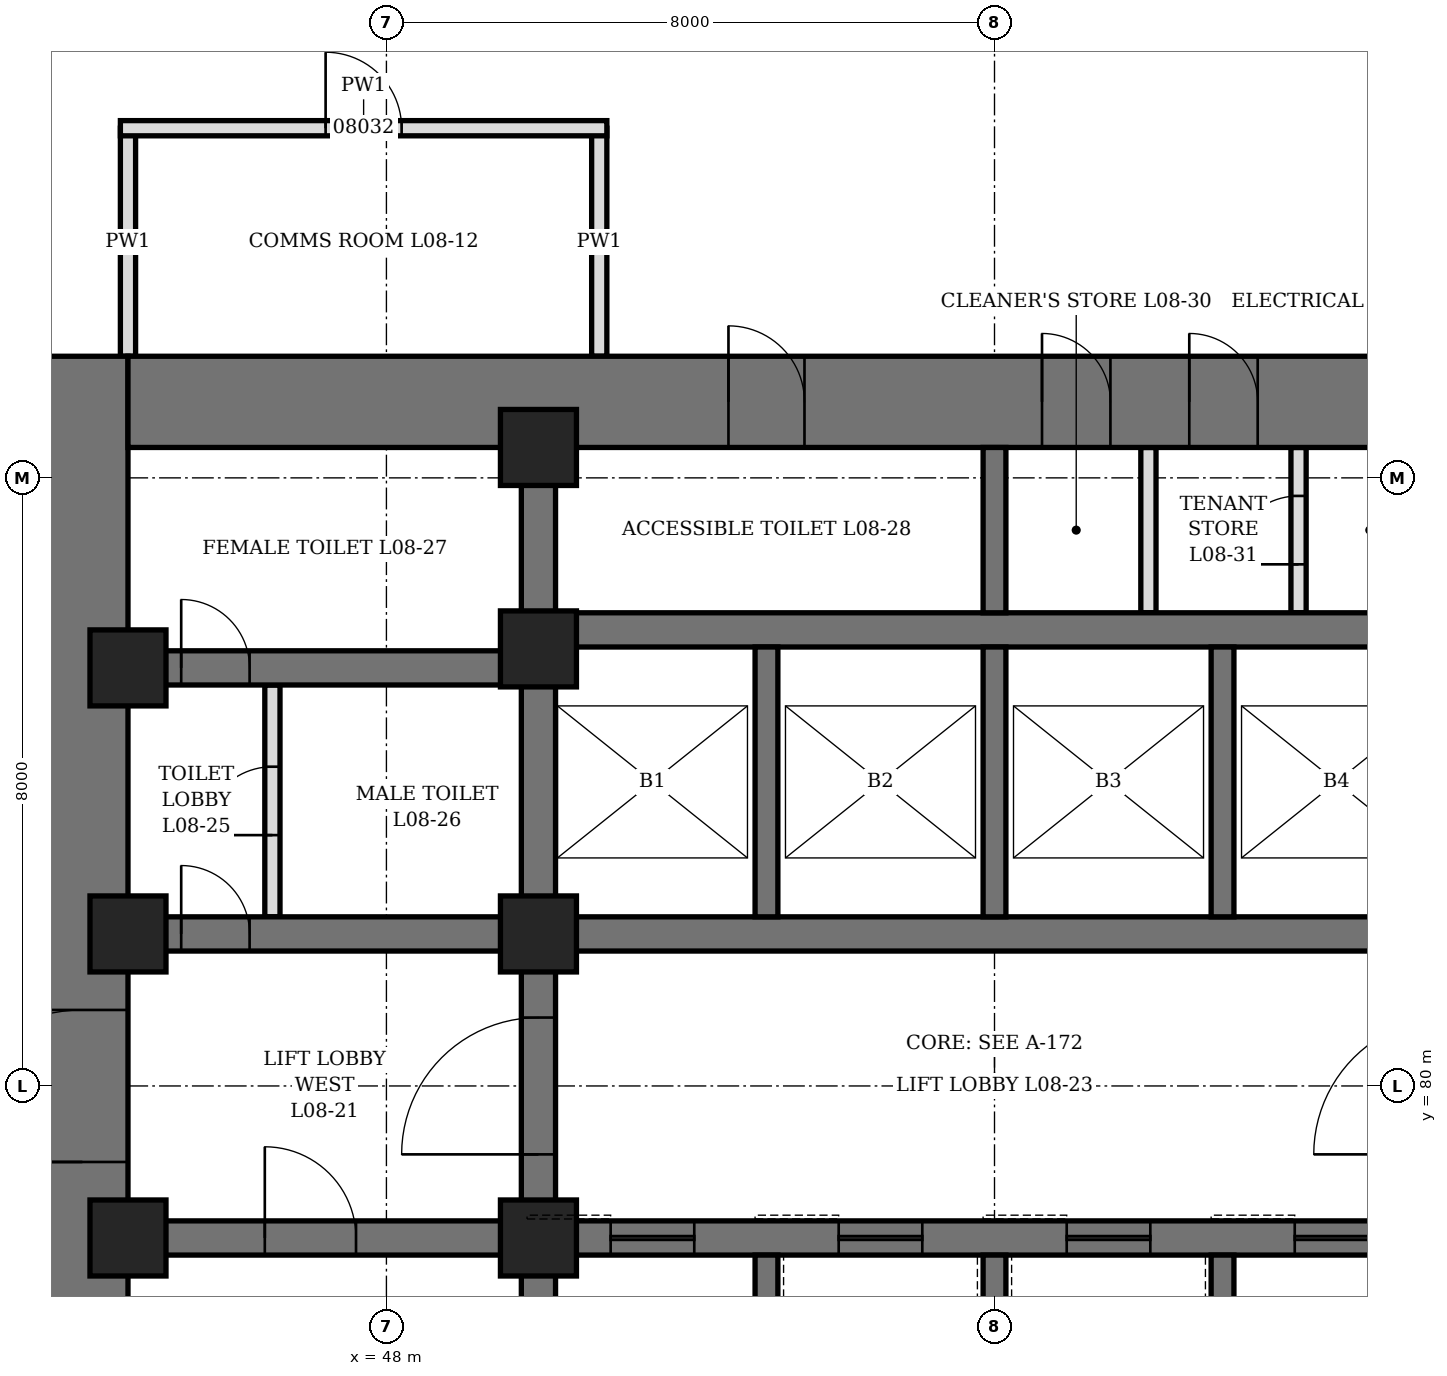
"""IFC4 building model, lengths in metres.
Left out: names, types, materials, properties, quantities, classifications, styles, units other than length and angle.
Written with IfcOpenShell. Run it as: python <this file> out.ifc"""

import sys

from ifc_helpers import new_model, si_unit, direction, frame, frame_2d, origin, origin_2d, place, context, subcontext, project, spatial, rectangle, hollow_rectangle, extrude, element, fill, save


model = new_model("IFC4")
c1 = context("Model", 3, precision=1e-05, world=origin(), true_north=direction((0.0, 1.0)))
c2 = subcontext(c1, "Body", "Model", "MODEL_VIEW")
j1 = project(units=[si_unit("LENGTHUNIT", "METRE"), si_unit("PLANEANGLEUNIT", "RADIAN")], contexts=[c1])
p1 = place(None, origin())
s1 = spatial("IfcSite", under=j1, at=p1, CompositionType="ELEMENT")
p2 = place(p1, origin())
s2 = spatial("IfcBuilding", under=s1, at=p2, CompositionType="ELEMENT")
p3 = place(p2, frame((0.0, 0.0, 43.3)))
s3 = spatial("IfcBuildingStorey", under=s2, at=p3, CompositionType="ELEMENT", Elevation=43.3)
p4 = place(p3, frame((44.0, 70.4, 0.0), z_axis=(0.0, 0.0, 1.0), x_axis=(0.0, 1.0, 0.0)))
e1 = element("IfcWall", 1, at=p4, inside=s3, PredefinedType="SHEAR", context=c2, shape_type="SweptSolid", body=[
    extrude(rectangle(XDim=19.2, YDim=1.2, at=frame_2d((9.6, 0.0))), origin(), (0.0, 0.0, 1.0), 4.2),
])
p5 = place(p4, frame((8.6, 0.0, 0.0)))
e2 = element("IfcOpeningElement", 2, at=p5, cuts=e1, PredefinedType="OPENING", context=c2, shape_type="SweptSolid", body=[
    extrude(rectangle(XDim=2.0, YDim=2.4, at=frame_2d((1.0, 1.2))), frame((0.0, 0.61, 0.0), z_axis=(0.0, -1.0, 0.0), x_axis=(1.0, 0.0, 0.0)), (0.0, 0.0, 1.0), 1.22),
])
p6 = place(p3, frame((44.6, 89.0, 0.0), z_axis=(0.0, 0.0, 1.0), x_axis=(1.0, 0.0, 0.0)))
e3 = element("IfcWall", 3, at=p6, inside=s3, PredefinedType="SHEAR", context=c2, shape_type="SweptSolid", body=[
    extrude(rectangle(XDim=22.8, YDim=1.2, at=frame_2d((11.4, 0.0))), origin(), (0.0, 0.0, 1.0), 4.2),
])
p7 = place(p6, frame((7.9, 0.0, 0.0)))
e4 = element("IfcOpeningElement", 4, at=p7, cuts=e3, PredefinedType="OPENING", context=c2, shape_type="SweptSolid", body=[
    extrude(rectangle(XDim=1.0, YDim=2.1, at=frame_2d((0.5, 1.05))), frame((0.0, 0.61, 0.0), z_axis=(0.0, -1.0, 0.0), x_axis=(1.0, 0.0, 0.0)), (0.0, 0.0, 1.0), 1.22),
])
p8 = place(p6, frame((12.025, 0.0, 0.0)))
e5 = element("IfcOpeningElement", 5, at=p8, cuts=e3, PredefinedType="OPENING", context=c2, shape_type="SweptSolid", body=[
    extrude(rectangle(XDim=0.9, YDim=2.1, at=frame_2d((0.45, 1.05))), frame((0.0, 0.61, 0.0), z_axis=(0.0, -1.0, 0.0), x_axis=(1.0, 0.0, 0.0)), (0.0, 0.0, 1.0), 1.22),
])
p9 = place(p6, frame((13.962, 0.0, 0.0)))
e6 = element("IfcOpeningElement", 6, at=p9, cuts=e3, PredefinedType="OPENING", context=c2, shape_type="SweptSolid", body=[
    extrude(rectangle(XDim=0.9, YDim=2.1, at=frame_2d((0.45, 1.05))), frame((0.0, 0.61, 0.0), z_axis=(0.0, -1.0, 0.0), x_axis=(1.0, 0.0, 0.0)), (0.0, 0.0, 1.0), 1.22),
])
p10 = place(p3, frame((50.0, 71.6, 0.0), z_axis=(0.0, 0.0, 1.0), x_axis=(0.0, 1.0, 0.0)))
e7 = element("IfcWall", 7, at=p10, inside=s3, PredefinedType="SHEAR", context=c2, shape_type="SweptSolid", body=[
    extrude(rectangle(XDim=16.8, YDim=0.45, at=frame_2d((8.4, 0.0))), origin(), (0.0, 0.0, 1.0), 4.2),
])
p11 = place(p10, frame((7.5, 0.0, 0.0)))
e8 = element("IfcOpeningElement", 8, at=p11, cuts=e7, PredefinedType="OPENING", context=c2, shape_type="SweptSolid", body=[
    extrude(rectangle(XDim=1.8, YDim=2.4, at=frame_2d((0.9, 1.2))), frame((0.0, 0.235, 0.0), z_axis=(0.0, -1.0, 0.0), x_axis=(1.0, 0.0, 0.0)), (0.0, 0.0, 1.0), 0.47),
])
p12 = place(p3, frame((44.6, 78.0, 0.0), z_axis=(0.0, 0.0, 1.0), x_axis=(1.0, 0.0, 0.0)))
e9 = element("IfcWall", 9, at=p12, inside=s3, PredefinedType="SHEAR", context=c2, shape_type="SweptSolid", body=[
    extrude(rectangle(XDim=5.175, YDim=0.45, at=frame_2d((2.587, 0.0))), origin(), (0.0, 0.0, 1.0), 4.2),
])
p13 = place(p12, frame((1.8, 0.0, 0.0)))
e10 = element("IfcOpeningElement", 10, at=p13, cuts=e9, PredefinedType="OPENING", context=c2, shape_type="SweptSolid", body=[
    extrude(rectangle(XDim=1.2, YDim=2.1, at=frame_2d((0.6, 1.05))), frame((0.0, 0.235, 0.0), z_axis=(0.0, -1.0, 0.0), x_axis=(1.0, 0.0, 0.0)), (0.0, 0.0, 1.0), 0.47),
])
p14 = place(p3, frame((44.6, 82.0, 0.0), z_axis=(0.0, 0.0, 1.0), x_axis=(1.0, 0.0, 0.0)))
e11 = element("IfcWall", 11, at=p14, inside=s3, PredefinedType="SHEAR", context=c2, shape_type="SweptSolid", body=[
    extrude(rectangle(XDim=5.175, YDim=0.45, at=frame_2d((2.587, 0.0))), origin(), (0.0, 0.0, 1.0), 4.2),
])
p15 = place(p14, frame((0.7, 0.0, 0.0)))
e12 = element("IfcOpeningElement", 12, at=p15, cuts=e11, PredefinedType="OPENING", context=c2, shape_type="SweptSolid", body=[
    extrude(rectangle(XDim=0.9, YDim=2.1, at=frame_2d((0.45, 1.05))), frame((0.0, 0.235, 0.0), z_axis=(0.0, -1.0, 0.0), x_axis=(1.0, 0.0, 0.0)), (0.0, 0.0, 1.0), 0.47),
])
p16 = place(p3, frame((44.6, 85.5, 0.0), z_axis=(0.0, 0.0, 1.0), x_axis=(1.0, 0.0, 0.0)))
e13 = element("IfcWall", 13, at=p16, inside=s3, PredefinedType="SHEAR", context=c2, shape_type="SweptSolid", body=[
    extrude(rectangle(XDim=5.175, YDim=0.45, at=frame_2d((2.587, 0.0))), origin(), (0.0, 0.0, 1.0), 4.2),
])
p17 = place(p16, frame((0.7, 0.0, 0.0)))
e14 = element("IfcOpeningElement", 14, at=p17, cuts=e13, PredefinedType="OPENING", context=c2, shape_type="SweptSolid", body=[
    extrude(rectangle(XDim=0.9, YDim=2.1, at=frame_2d((0.45, 1.05))), frame((0.0, 0.235, 0.0), z_axis=(0.0, -1.0, 0.0), x_axis=(1.0, 0.0, 0.0)), (0.0, 0.0, 1.0), 0.47),
])
p18 = place(p3, frame((50.225, 78.0, 0.0), z_axis=(0.0, 0.0, 1.0), x_axis=(1.0, 0.0, 0.0)))
e15 = element("IfcWall", 15, at=p18, inside=s3, PredefinedType="SHEAR", context=c2, shape_type="SweptSolid", body=[
    extrude(rectangle(XDim=11.55, YDim=0.45, at=frame_2d((5.775, 0.0))), origin(), (0.0, 0.0, 1.0), 4.2),
])
p19 = place(p18, frame((0.725, 0.0, 0.0)))
e16 = element("IfcOpeningElement", 16, at=p19, cuts=e15, PredefinedType="OPENING", context=c2, shape_type="SweptSolid", body=[
    extrude(rectangle(XDim=1.1, YDim=2.2, at=frame_2d((0.55, 1.1))), frame((0.0, 0.235, 0.0), z_axis=(0.0, -1.0, 0.0), x_axis=(1.0, 0.0, 0.0)), (0.0, 0.0, 1.0), 0.47),
])
p20 = place(p18, frame((3.725, 0.0, 0.0)))
e17 = element("IfcOpeningElement", 17, at=p20, cuts=e15, PredefinedType="OPENING", context=c2, shape_type="SweptSolid", body=[
    extrude(rectangle(XDim=1.1, YDim=2.2, at=frame_2d((0.55, 1.1))), frame((0.0, 0.235, 0.0), z_axis=(0.0, -1.0, 0.0), x_axis=(1.0, 0.0, 0.0)), (0.0, 0.0, 1.0), 0.47),
])
p21 = place(p18, frame((6.725, 0.0, 0.0)))
e18 = element("IfcOpeningElement", 18, at=p21, cuts=e15, PredefinedType="OPENING", context=c2, shape_type="SweptSolid", body=[
    extrude(rectangle(XDim=1.1, YDim=2.2, at=frame_2d((0.55, 1.1))), frame((0.0, 0.235, 0.0), z_axis=(0.0, -1.0, 0.0), x_axis=(1.0, 0.0, 0.0)), (0.0, 0.0, 1.0), 0.47),
])
p22 = place(p18, frame((9.725, 0.0, 0.0)))
e19 = element("IfcOpeningElement", 19, at=p22, cuts=e15, PredefinedType="OPENING", context=c2, shape_type="SweptSolid", body=[
    extrude(rectangle(XDim=1.1, YDim=2.2, at=frame_2d((0.55, 1.1))), frame((0.0, 0.235, 0.0), z_axis=(0.0, -1.0, 0.0), x_axis=(1.0, 0.0, 0.0)), (0.0, 0.0, 1.0), 0.47),
])
for number, where, z_axis, x_axis in (
    (20, (50.225, 82.0, 0.0), (0.0, 0.0, 1.0), (1.0, 0.0, 0.0)),
    (21, (50.225, 86.0, 0.0), (0.0, 0.0, 1.0), (1.0, 0.0, 0.0)),
):
    element("IfcWall", number, at=place(p3, frame(where, z_axis=z_axis, x_axis=x_axis)), inside=s3, PredefinedType="SHEAR", context=c2, shape_type="SweptSolid", body=[
        extrude(rectangle(XDim=11.55, YDim=0.45, at=frame_2d((5.775, 0.0))), origin(), (0.0, 0.0, 1.0), 4.2),
    ])
p23 = place(p3, frame((53.0, 74.15, 0.0), z_axis=(0.0, 0.0, 1.0), x_axis=(0.0, 1.0, 0.0)))
e22 = element("IfcWall", 22, at=p23, inside=s3, PredefinedType="SHEAR", context=c2, shape_type="SweptSolid", body=[
    extrude(rectangle(XDim=3.625, YDim=0.3, at=frame_2d((1.812, 0.0))), origin(), (0.0, 0.0, 1.0), 4.2),
])
p24 = place(p3, frame((53.0, 82.225, 0.0), z_axis=(0.0, 0.0, 1.0), x_axis=(0.0, 1.0, 0.0)))
e23 = element("IfcWall", 23, at=p24, inside=s3, PredefinedType="SHEAR", context=c2, shape_type="SweptSolid", body=[
    extrude(rectangle(XDim=3.55, YDim=0.3, at=frame_2d((1.775, 0.0))), origin(), (0.0, 0.0, 1.0), 4.2),
])
p25 = place(p3, frame((56.0, 74.15, 0.0), z_axis=(0.0, 0.0, 1.0), x_axis=(0.0, 1.0, 0.0)))
e24 = element("IfcWall", 24, at=p25, inside=s3, PredefinedType="SHEAR", context=c2, shape_type="SweptSolid", body=[
    extrude(rectangle(XDim=3.625, YDim=0.3, at=frame_2d((1.812, 0.0))), origin(), (0.0, 0.0, 1.0), 4.2),
])
p26 = place(p3, frame((56.0, 82.225, 0.0), z_axis=(0.0, 0.0, 1.0), x_axis=(0.0, 1.0, 0.0)))
e25 = element("IfcWall", 25, at=p26, inside=s3, PredefinedType="SHEAR", context=c2, shape_type="SweptSolid", body=[
    extrude(rectangle(XDim=3.55, YDim=0.3, at=frame_2d((1.775, 0.0))), origin(), (0.0, 0.0, 1.0), 4.2),
])
p27 = place(p3, frame((59.0, 74.15, 0.0), z_axis=(0.0, 0.0, 1.0), x_axis=(0.0, 1.0, 0.0)))
e26 = element("IfcWall", 26, at=p27, inside=s3, PredefinedType="SHEAR", context=c2, shape_type="SweptSolid", body=[
    extrude(rectangle(XDim=3.625, YDim=0.3, at=frame_2d((1.812, 0.0))), origin(), (0.0, 0.0, 1.0), 4.2),
])
p28 = place(p3, frame((59.0, 82.225, 0.0), z_axis=(0.0, 0.0, 1.0), x_axis=(0.0, 1.0, 0.0)))
e27 = element("IfcWall", 27, at=p28, inside=s3, PredefinedType="SHEAR", context=c2, shape_type="SweptSolid", body=[
    extrude(rectangle(XDim=3.55, YDim=0.3, at=frame_2d((1.775, 0.0))), origin(), (0.0, 0.0, 1.0), 4.2),
])
p29 = place(p3, frame((56.0, 86.225, 0.0), z_axis=(0.0, 0.0, 1.0), x_axis=(0.0, 1.0, 0.0)))
e28 = element("IfcWall", 28, at=p29, inside=s3, PredefinedType="SHEAR", context=c2, shape_type="SweptSolid", body=[
    extrude(rectangle(XDim=2.175, YDim=0.3, at=frame_2d((1.087, 0.0))), origin(), (0.0, 0.0, 1.0), 4.2),
])
for number, where, z_axis, x_axis in (
    (29, (44.6, 78.0, 0.0), (0.0, 0.0, 1.0), (1.0, 0.0, 0.0)),
    (30, (44.6, 82.0, 0.0), (0.0, 0.0, 1.0), (1.0, 0.0, 0.0)),
    (31, (44.6, 85.5, 0.0), (0.0, 0.0, 1.0), (1.0, 0.0, 0.0)),
    (32, (50.0, 78.0, 0.0), (0.0, 0.0, 1.0), (1.0, 0.0, 0.0)),
    (33, (50.0, 82.0, 0.0), (0.0, 0.0, 1.0), (1.0, 0.0, 0.0)),
    (34, (50.0, 85.75, 0.0), (0.0, 0.0, 1.0), (1.0, 0.0, 0.0)),
    (35, (50.0, 88.4, 0.0), (0.0, 0.0, 1.0), (1.0, 0.0, 0.0)),
):
    element("IfcColumn", number, at=place(p3, frame(where, z_axis=z_axis, x_axis=x_axis)), inside=s3, PredefinedType="COLUMN", context=c2, shape_type="SweptSolid", body=[
        extrude(hollow_rectangle(XDim=1.0, YDim=1.0, WallThickness=0.15, at=origin_2d()), origin(), (0.0, 0.0, 1.0), 4.2),
    ])
p30 = place(p3, frame((46.5, 82.225, 0.0), z_axis=(0.0, 0.0, 1.0), x_axis=(0.0, 1.0, 0.0)))
e36 = element("IfcWall", 36, at=p30, inside=s3, PredefinedType="PARTITIONING", context=c2, shape_type="SweptSolid", body=[
    extrude(rectangle(XDim=3.05, YDim=0.2, at=frame_2d((1.525, 0.0))), origin(), (0.0, 0.0, 1.0), 4.04),
])
p31 = place(p30, frame((1.075, 0.0, 0.0)))
e37 = element("IfcOpeningElement", 37, at=p31, cuts=e36, PredefinedType="OPENING", context=c2, shape_type="SweptSolid", body=[
    extrude(rectangle(XDim=0.9, YDim=2.1, at=frame_2d((0.45, 1.05))), frame((0.0, 0.11, 0.0), z_axis=(0.0, -1.0, 0.0), x_axis=(1.0, 0.0, 0.0)), (0.0, 0.0, 1.0), 0.22),
])
p32 = place(p3, frame((60.0, 86.225, 0.0), z_axis=(0.0, 0.0, 1.0), x_axis=(0.0, 1.0, 0.0)))
e38 = element("IfcWall", 38, at=p32, inside=s3, PredefinedType="PARTITIONING", context=c2, shape_type="SweptSolid", body=[
    extrude(rectangle(XDim=2.175, YDim=0.2, at=frame_2d((1.087, 0.0))), origin(), (0.0, 0.0, 1.0), 4.04),
])
p33 = place(p32, frame((0.637, 0.0, 0.0)))
e39 = element("IfcOpeningElement", 39, at=p33, cuts=e38, PredefinedType="OPENING", context=c2, shape_type="SweptSolid", body=[
    extrude(rectangle(XDim=0.9, YDim=2.1, at=frame_2d((0.45, 1.05))), frame((0.0, 0.11, 0.0), z_axis=(0.0, -1.0, 0.0), x_axis=(1.0, 0.0, 0.0)), (0.0, 0.0, 1.0), 0.22),
])
p34 = place(p3, frame((58.025, 86.225, 0.0), z_axis=(0.0, 0.0, 1.0), x_axis=(0.0, 1.0, 0.0)))
e40 = element("IfcWall", 40, at=p34, inside=s3, PredefinedType="PARTITIONING", context=c2, shape_type="SweptSolid", body=[
    extrude(rectangle(XDim=2.175, YDim=0.2, at=frame_2d((1.087, 0.0))), origin(), (0.0, 0.0, 1.0), 4.04),
])
for number, where, z_axis, x_axis in (
    (41, (44.6, 89.6, 0.0), (0.0, 0.0, 1.0), (0.0, 1.0, 0.0)),
    (42, (50.8, 89.6, 0.0), (0.0, 0.0, 1.0), (0.0, 1.0, 0.0)),
):
    element("IfcWall", number, at=place(p3, frame(where, z_axis=z_axis, x_axis=x_axis)), inside=s3, PredefinedType="PARTITIONING", context=c2, shape_type="SweptSolid", body=[
        extrude(rectangle(XDim=3.0, YDim=0.2, at=frame_2d((1.5, 0.0))), origin(), (0.0, 0.0, 1.0), 4.04),
    ])
p35 = place(p3, frame((44.5, 92.6, 0.0), z_axis=(0.0, 0.0, 1.0), x_axis=(1.0, 0.0, 0.0)))
e43 = element("IfcWall", 43, at=p35, inside=s3, PredefinedType="PARTITIONING", context=c2, shape_type="SweptSolid", body=[
    extrude(rectangle(XDim=6.4, YDim=0.2, at=frame_2d((3.2, 0.0))), origin(), (0.0, 0.0, 1.0), 4.04),
])
p36 = place(p35, frame((2.7, 0.0, 0.0)))
e44 = element("IfcOpeningElement", 44, at=p36, cuts=e43, PredefinedType="OPENING", context=c2, shape_type="SweptSolid", body=[
    extrude(rectangle(XDim=1.0, YDim=2.1, at=frame_2d((0.5, 1.05))), frame((0.0, 0.11, 0.0), z_axis=(0.0, -1.0, 0.0), x_axis=(1.0, 0.0, 0.0)), (0.0, 0.0, 1.0), 0.22),
])
p37 = place(p15, origin())
e45 = element("IfcDoor", 45, at=p37, inside=s3, OperationType="SINGLE_SWING_LEFT", PredefinedType="DOOR", context=c2, shape_type="SweptSolid", body=[
    extrude(rectangle(XDim=0.9, YDim=2.1, at=frame_2d((0.45, 1.05))), frame((0.0, 0.225, 0.0), z_axis=(0.0, -1.0, 0.0), x_axis=(1.0, 0.0, 0.0)), (0.0, 0.0, 1.0), 0.449),
])
fill(e12, e45)
p38 = place(p31, origin())
e46 = element("IfcDoor", 46, at=p38, inside=s3, OperationType="SINGLE_SWING_RIGHT", PredefinedType="DOOR", context=c2, shape_type="SweptSolid", body=[
    extrude(rectangle(XDim=0.9, YDim=2.1, at=frame_2d((0.45, 1.05))), frame((0.0, 0.1, 0.0), z_axis=(0.0, -1.0, 0.0), x_axis=(1.0, 0.0, 0.0)), (0.0, 0.0, 1.0), 0.199),
])
fill(e37, e46)
p39 = place(p17, origin())
e47 = element("IfcDoor", 47, at=p39, inside=s3, OperationType="SINGLE_SWING_RIGHT", PredefinedType="DOOR", context=c2, shape_type="SweptSolid", body=[
    extrude(rectangle(XDim=0.9, YDim=2.1, at=frame_2d((0.45, 1.05))), frame((0.0, 0.225, 0.0), z_axis=(0.0, -1.0, 0.0), x_axis=(1.0, 0.0, 0.0)), (0.0, 0.0, 1.0), 0.449),
])
fill(e14, e47)
p40 = place(p7, origin())
e48 = element("IfcDoor", 48, at=p40, inside=s3, OperationType="SINGLE_SWING_LEFT", PredefinedType="DOOR", context=c2, shape_type="SweptSolid", body=[
    extrude(rectangle(XDim=1.0, YDim=2.1, at=frame_2d((0.5, 1.05))), frame((0.0, 0.35, 0.0), z_axis=(0.0, -1.0, 0.0), x_axis=(1.0, 0.0, 0.0)), (0.0, 0.0, 1.0), 0.7),
])
fill(e4, e48)
p41 = place(p8, origin())
e49 = element("IfcDoor", 49, at=p41, inside=s3, OperationType="SINGLE_SWING_LEFT", PredefinedType="DOOR", context=c2, shape_type="SweptSolid", body=[
    extrude(rectangle(XDim=0.9, YDim=2.1, at=frame_2d((0.45, 1.05))), frame((0.0, 0.35, 0.0), z_axis=(0.0, -1.0, 0.0), x_axis=(1.0, 0.0, 0.0)), (0.0, 0.0, 1.0), 0.7),
])
fill(e5, e49)
p42 = place(p9, origin())
e50 = element("IfcDoor", 50, at=p42, inside=s3, OperationType="SINGLE_SWING_LEFT", PredefinedType="DOOR", context=c2, shape_type="SweptSolid", body=[
    extrude(rectangle(XDim=0.9, YDim=2.1, at=frame_2d((0.45, 1.05))), frame((0.0, 0.35, 0.0), z_axis=(0.0, -1.0, 0.0), x_axis=(1.0, 0.0, 0.0)), (0.0, 0.0, 1.0), 0.7),
])
fill(e6, e50)
p43 = place(p33, origin())
e51 = element("IfcDoor", 51, at=p43, inside=s3, OperationType="SINGLE_SWING_LEFT", PredefinedType="DOOR", context=c2, shape_type="SweptSolid", body=[
    extrude(rectangle(XDim=0.9, YDim=2.1, at=frame_2d((0.45, 1.05))), frame((0.0, 0.1, 0.0), z_axis=(0.0, -1.0, 0.0), x_axis=(1.0, 0.0, 0.0)), (0.0, 0.0, 1.0), 0.199),
])
fill(e39, e51)
p44 = place(p13, origin())
e52 = element("IfcDoor", 52, at=p44, inside=s3, OperationType="SINGLE_SWING_LEFT", PredefinedType="DOOR", context=c2, shape_type="SweptSolid", body=[
    extrude(rectangle(XDim=1.2, YDim=2.1, at=frame_2d((0.6, 1.05))), frame((0.0, 0.225, 0.0), z_axis=(0.0, -1.0, 0.0), x_axis=(1.0, 0.0, 0.0)), (0.0, 0.0, 1.0), 0.449),
])
fill(e10, e52)
p45 = place(p5, origin())
e53 = element("IfcDoor", 53, at=p45, inside=s3, OperationType="DOUBLE_DOOR_SINGLE_SWING", PredefinedType="DOOR", context=c2, shape_type="SweptSolid", body=[
    extrude(rectangle(XDim=2.0, YDim=2.4, at=frame_2d((1.0, 1.2))), frame((0.0, 0.35, 0.0), z_axis=(0.0, -1.0, 0.0), x_axis=(1.0, 0.0, 0.0)), (0.0, 0.0, 1.0), 0.7),
])
fill(e2, e53)
p46 = place(p11, origin())
e54 = element("IfcDoor", 54, at=p46, inside=s3, OperationType="DOUBLE_DOOR_SINGLE_SWING", PredefinedType="DOOR", context=c2, shape_type="SweptSolid", body=[
    extrude(rectangle(XDim=1.8, YDim=2.4, at=frame_2d((0.9, 1.2))), frame((0.0, 0.225, 0.0), z_axis=(0.0, -1.0, 0.0), x_axis=(1.0, 0.0, 0.0)), (0.0, 0.0, 1.0), 0.449),
])
fill(e8, e54)
p47 = place(p19, origin())
e55 = element("IfcDoor", 55, at=p47, inside=s3, OperationType="SLIDING_TO_LEFT", PredefinedType="DOOR", context=c2, shape_type="SweptSolid", body=[
    extrude(rectangle(XDim=1.1, YDim=2.2, at=frame_2d((0.55, 1.1))), frame((0.0, 0.225, 0.0), z_axis=(0.0, -1.0, 0.0), x_axis=(1.0, 0.0, 0.0)), (0.0, 0.0, 1.0), 0.449),
])
fill(e16, e55)
p48 = place(p20, origin())
e56 = element("IfcDoor", 56, at=p48, inside=s3, OperationType="SLIDING_TO_LEFT", PredefinedType="DOOR", context=c2, shape_type="SweptSolid", body=[
    extrude(rectangle(XDim=1.1, YDim=2.2, at=frame_2d((0.55, 1.1))), frame((0.0, 0.225, 0.0), z_axis=(0.0, -1.0, 0.0), x_axis=(1.0, 0.0, 0.0)), (0.0, 0.0, 1.0), 0.449),
])
fill(e17, e56)
p49 = place(p21, origin())
e57 = element("IfcDoor", 57, at=p49, inside=s3, OperationType="SLIDING_TO_LEFT", PredefinedType="DOOR", context=c2, shape_type="SweptSolid", body=[
    extrude(rectangle(XDim=1.1, YDim=2.2, at=frame_2d((0.55, 1.1))), frame((0.0, 0.225, 0.0), z_axis=(0.0, -1.0, 0.0), x_axis=(1.0, 0.0, 0.0)), (0.0, 0.0, 1.0), 0.449),
])
fill(e18, e57)
p50 = place(p22, origin())
e58 = element("IfcDoor", 58, at=p50, inside=s3, OperationType="SLIDING_TO_LEFT", PredefinedType="DOOR", context=c2, shape_type="SweptSolid", body=[
    extrude(rectangle(XDim=1.1, YDim=2.2, at=frame_2d((0.55, 1.1))), frame((0.0, 0.225, 0.0), z_axis=(0.0, -1.0, 0.0), x_axis=(1.0, 0.0, 0.0)), (0.0, 0.0, 1.0), 0.449),
])
fill(e19, e58)
p51 = place(p36, origin())
e59 = element("IfcDoor", 59, at=p51, inside=s3, OperationType="SINGLE_SWING_LEFT", PredefinedType="DOOR", context=c2, shape_type="SweptSolid", body=[
    extrude(rectangle(XDim=1.0, YDim=2.1, at=frame_2d((0.5, 1.05))), frame((0.0, 0.1, 0.0), z_axis=(0.0, -1.0, 0.0), x_axis=(1.0, 0.0, 0.0)), (0.0, 0.0, 1.0), 0.199),
])
fill(e44, e59)
save(model, sys.argv[1])
